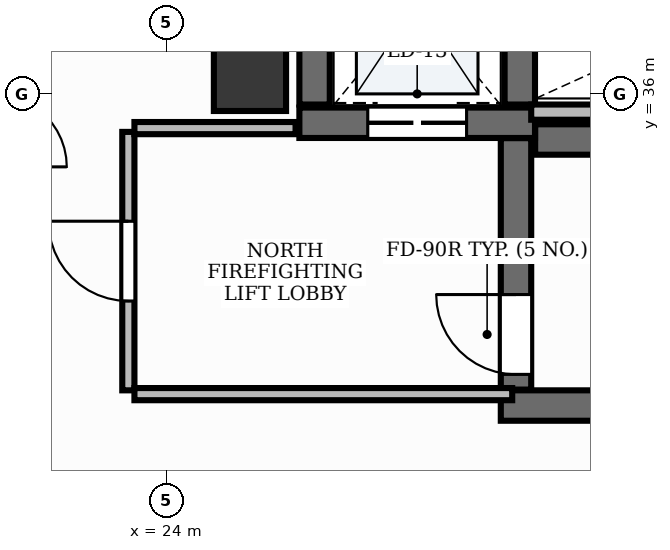
"""IFC4 building model, lengths in metres.
Left out: names, types, materials, properties, quantities, classifications, styles, units other than length and angle.
Written with IfcOpenShell. Run it as: python <this file> out.ifc"""

import sys

from ifc_helpers import new_model, si_unit, direction, frame, frame_2d, origin, origin_2d, place, context, subcontext, project, spatial, rectangle, extrude, element, fill, save


model = new_model("IFC4")
c1 = context("Model", 3, precision=1e-05, world=origin(), true_north=direction((0.0, 1.0)))
c2 = subcontext(c1, "Body", "Model", "MODEL_VIEW")
j1 = project(units=[si_unit("LENGTHUNIT", "METRE"), si_unit("PLANEANGLEUNIT", "RADIAN")], contexts=[c1])
p1 = place(None, origin())
s1 = spatial("IfcSite", under=j1, at=p1, CompositionType="ELEMENT")
p2 = place(p1, origin())
s2 = spatial("IfcBuilding", under=s1, at=p2, CompositionType="ELEMENT")
p3 = place(p2, frame((0.0, 0.0, 187.8)))
s3 = spatial("IfcBuildingStorey", under=s2, at=p3, CompositionType="ELEMENT", Elevation=187.8)
p4 = place(p3, frame((28.852, 35.4, 0.0), z_axis=(0.0, 0.0, 1.0), x_axis=(1.0, 0.0, 0.0)))
e1 = element("IfcWall", 1, at=p4, inside=s3, PredefinedType="SHEAR", context=c2, shape_type="SweptSolid", body=[
    extrude(rectangle(XDim=8.198, YDim=0.4, at=frame_2d((4.099, 0.0))), origin(), (0.0, 0.0, 1.0), 3.9),
])
p5 = place(p3, frame((28.4, 31.9, 0.0), z_axis=(0.0, 0.0, 1.0), x_axis=(1.0, 0.0, 0.0)))
e2 = element("IfcWall", 2, at=p5, inside=s3, PredefinedType="SHEAR", context=c2, shape_type="SweptSolid", body=[
    extrude(rectangle(XDim=8.65, YDim=0.4, at=frame_2d((4.325, 0.0))), origin(), (0.0, 0.0, 1.0), 3.9),
])
p6 = place(p3, frame((28.6, 32.11, 0.0), z_axis=(0.0, 0.0, 1.0), x_axis=(0.0, 1.0, 0.0)))
e3 = element("IfcWall", 3, at=p6, inside=s3, PredefinedType="SHEAR", context=c2, shape_type="SweptSolid", body=[
    extrude(rectangle(XDim=3.308, YDim=0.4, at=frame_2d((1.654, 0.0))), origin(), (0.0, 0.0, 1.0), 3.9),
])
p7 = place(p6, frame((0.2, 0.0, 0.0)))
e4 = element("IfcOpeningElement", 4, at=p7, cuts=e3, PredefinedType="OPENING", context=c2, shape_type="SweptSolid", body=[
    extrude(rectangle(XDim=1.05, YDim=2.15, at=frame_2d((0.525, 1.075))), frame((0.0, 0.215, 0.0), z_axis=(0.0, -1.0, 0.0), x_axis=(1.0, 0.0, 0.0)), (0.0, 0.0, 1.0), 0.43),
])
p8 = place(p3, frame((25.75, 35.62, 0.0), z_axis=(0.0, 0.0, 1.0), x_axis=(1.0, 0.0, 0.0)))
e5 = element("IfcWall", 5, at=p8, inside=s3, PredefinedType="SHEAR", context=c2, shape_type="SweptSolid", body=[
    extrude(rectangle(XDim=3.1, YDim=0.4, at=frame_2d((1.55, 0.0))), origin(), (0.0, 0.0, 1.0), 3.9),
])
p9 = place(p8, frame((0.9, 0.0, 0.0)))
e6 = element("IfcOpeningElement", 6, at=p9, cuts=e5, PredefinedType="OPENING", context=c2, shape_type="SweptSolid", body=[
    extrude(rectangle(XDim=1.3, YDim=2.2, at=frame_2d((0.65, 1.1))), frame((0.0, 0.215, 0.0), z_axis=(0.0, -1.0, 0.0), x_axis=(1.0, 0.0, 0.0)), (0.0, 0.0, 1.0), 0.43),
])
for number, where, z_axis, x_axis in (
    (7, (25.95, 35.86, 0.0), (0.0, 0.0, 1.0), (0.0, 1.0, 0.0)),
    (8, (28.65, 35.86, 0.0), (0.0, 0.0, 1.0), (0.0, 1.0, 0.0)),
):
    element("IfcWall", number, at=place(p3, frame(where, z_axis=z_axis, x_axis=x_axis)), inside=s3, PredefinedType="SHEAR", context=c2, shape_type="SweptSolid", body=[
        extrude(rectangle(XDim=2.7, YDim=0.4, at=frame_2d((1.35, 0.0))), origin(), (0.0, 0.0, 1.0), 3.9),
    ])
p10 = place(p3, frame((25.1, 36.25, -0.0), z_axis=(0.0, 0.0, 1.0), x_axis=(1.0, 0.0, 0.0)))
e9 = element("IfcColumn", 9, at=p10, inside=s3, PredefinedType="PILASTER", context=c2, shape_type="SweptSolid", body=[
    extrude(rectangle(XDim=0.95, YDim=0.95, at=origin_2d()), origin(), (0.0, 0.0, 1.0), 3.901),
])
p11 = place(p3, frame((28.8, 35.76, 0.0), z_axis=(0.0, 0.0, 1.0), x_axis=(1.0, 0.0, 0.0)))
e10 = element("IfcWall", 10, at=p11, inside=s3, PredefinedType="PARTITIONING", context=c2, shape_type="SweptSolid", body=[
    extrude(rectangle(XDim=4.57, YDim=0.2, at=frame_2d((2.285, 0.0))), origin(), (0.0, 0.0, 1.0), 2.91),
])
p12 = place(p3, frame((23.5, 32.1, 0.0), z_axis=(0.0, 0.0, 1.0), x_axis=(0.0, 1.0, 0.0)))
e11 = element("IfcWall", 11, at=p12, inside=s3, PredefinedType="PARTITIONING", context=c2, shape_type="SweptSolid", body=[
    extrude(rectangle(XDim=3.4, YDim=0.16, at=frame_2d((1.7, 0.0))), origin(), (0.0, 0.0, 1.0), 2.91),
])
p13 = place(p12, frame((1.175, 0.0, 0.0)))
e12 = element("IfcOpeningElement", 12, at=p13, cuts=e11, PredefinedType="OPENING", context=c2, shape_type="SweptSolid", body=[
    extrude(rectangle(XDim=1.05, YDim=2.15, at=frame_2d((0.525, 1.075))), frame((0.0, 0.095, 0.0), z_axis=(0.0, -1.0, 0.0), x_axis=(1.0, 0.0, 0.0)), (0.0, 0.0, 1.0), 0.19),
])
p14 = place(p3, frame((23.58, 32.05, 0.0), z_axis=(0.0, 0.0, 1.0), x_axis=(1.0, 0.0, 0.0)))
e13 = element("IfcWall", 13, at=p14, inside=s3, PredefinedType="PARTITIONING", context=c2, shape_type="SweptSolid", body=[
    extrude(rectangle(XDim=4.97, YDim=0.16, at=frame_2d((2.485, 0.0))), origin(), (0.0, 0.0, 1.0), 2.91),
])
p15 = place(p3, frame((23.58, 35.55, 0.0), z_axis=(0.0, 0.0, 1.0), x_axis=(1.0, 0.0, 0.0)))
e14 = element("IfcWall", 14, at=p15, inside=s3, PredefinedType="PARTITIONING", context=c2, shape_type="SweptSolid", body=[
    extrude(rectangle(XDim=2.12, YDim=0.16, at=frame_2d((1.06, 0.0))), origin(), (0.0, 0.0, 1.0), 2.91),
])
p16 = place(p7, origin())
e15 = element("IfcDoor", 15, at=p16, inside=s3, OperationType="SINGLE_SWING_RIGHT", PredefinedType="DOOR", context=c2, shape_type="SweptSolid", body=[
    extrude(rectangle(XDim=1.05, YDim=2.15, at=frame_2d((0.525, 1.075))), frame((0.0, 0.025, 0.0), z_axis=(0.0, -1.0, 0.0), x_axis=(1.0, 0.0, 0.0)), (0.0, 0.0, 1.0), 0.05),
])
fill(e4, e15)
p17 = place(p9, origin())
e16 = element("IfcDoor", 16, at=p17, inside=s3, OperationType="DOUBLE_DOOR_SLIDING", PredefinedType="DOOR", context=c2, shape_type="SweptSolid", body=[
    extrude(rectangle(XDim=1.3, YDim=2.2, at=frame_2d((0.65, 1.1))), frame((0.0, 0.025, 0.0), z_axis=(0.0, -1.0, 0.0), x_axis=(1.0, 0.0, 0.0)), (0.0, 0.0, 1.0), 0.05),
])
fill(e6, e16)
p18 = place(p13, origin())
e17 = element("IfcDoor", 17, at=p18, inside=s3, OperationType="SINGLE_SWING_RIGHT", PredefinedType="DOOR", context=c2, shape_type="SweptSolid", body=[
    extrude(rectangle(XDim=1.05, YDim=2.15, at=frame_2d((0.525, 1.075))), frame((0.0, 0.025, 0.0), z_axis=(0.0, -1.0, 0.0), x_axis=(1.0, 0.0, 0.0)), (0.0, 0.0, 1.0), 0.05),
])
fill(e12, e17)
save(model, sys.argv[1])
